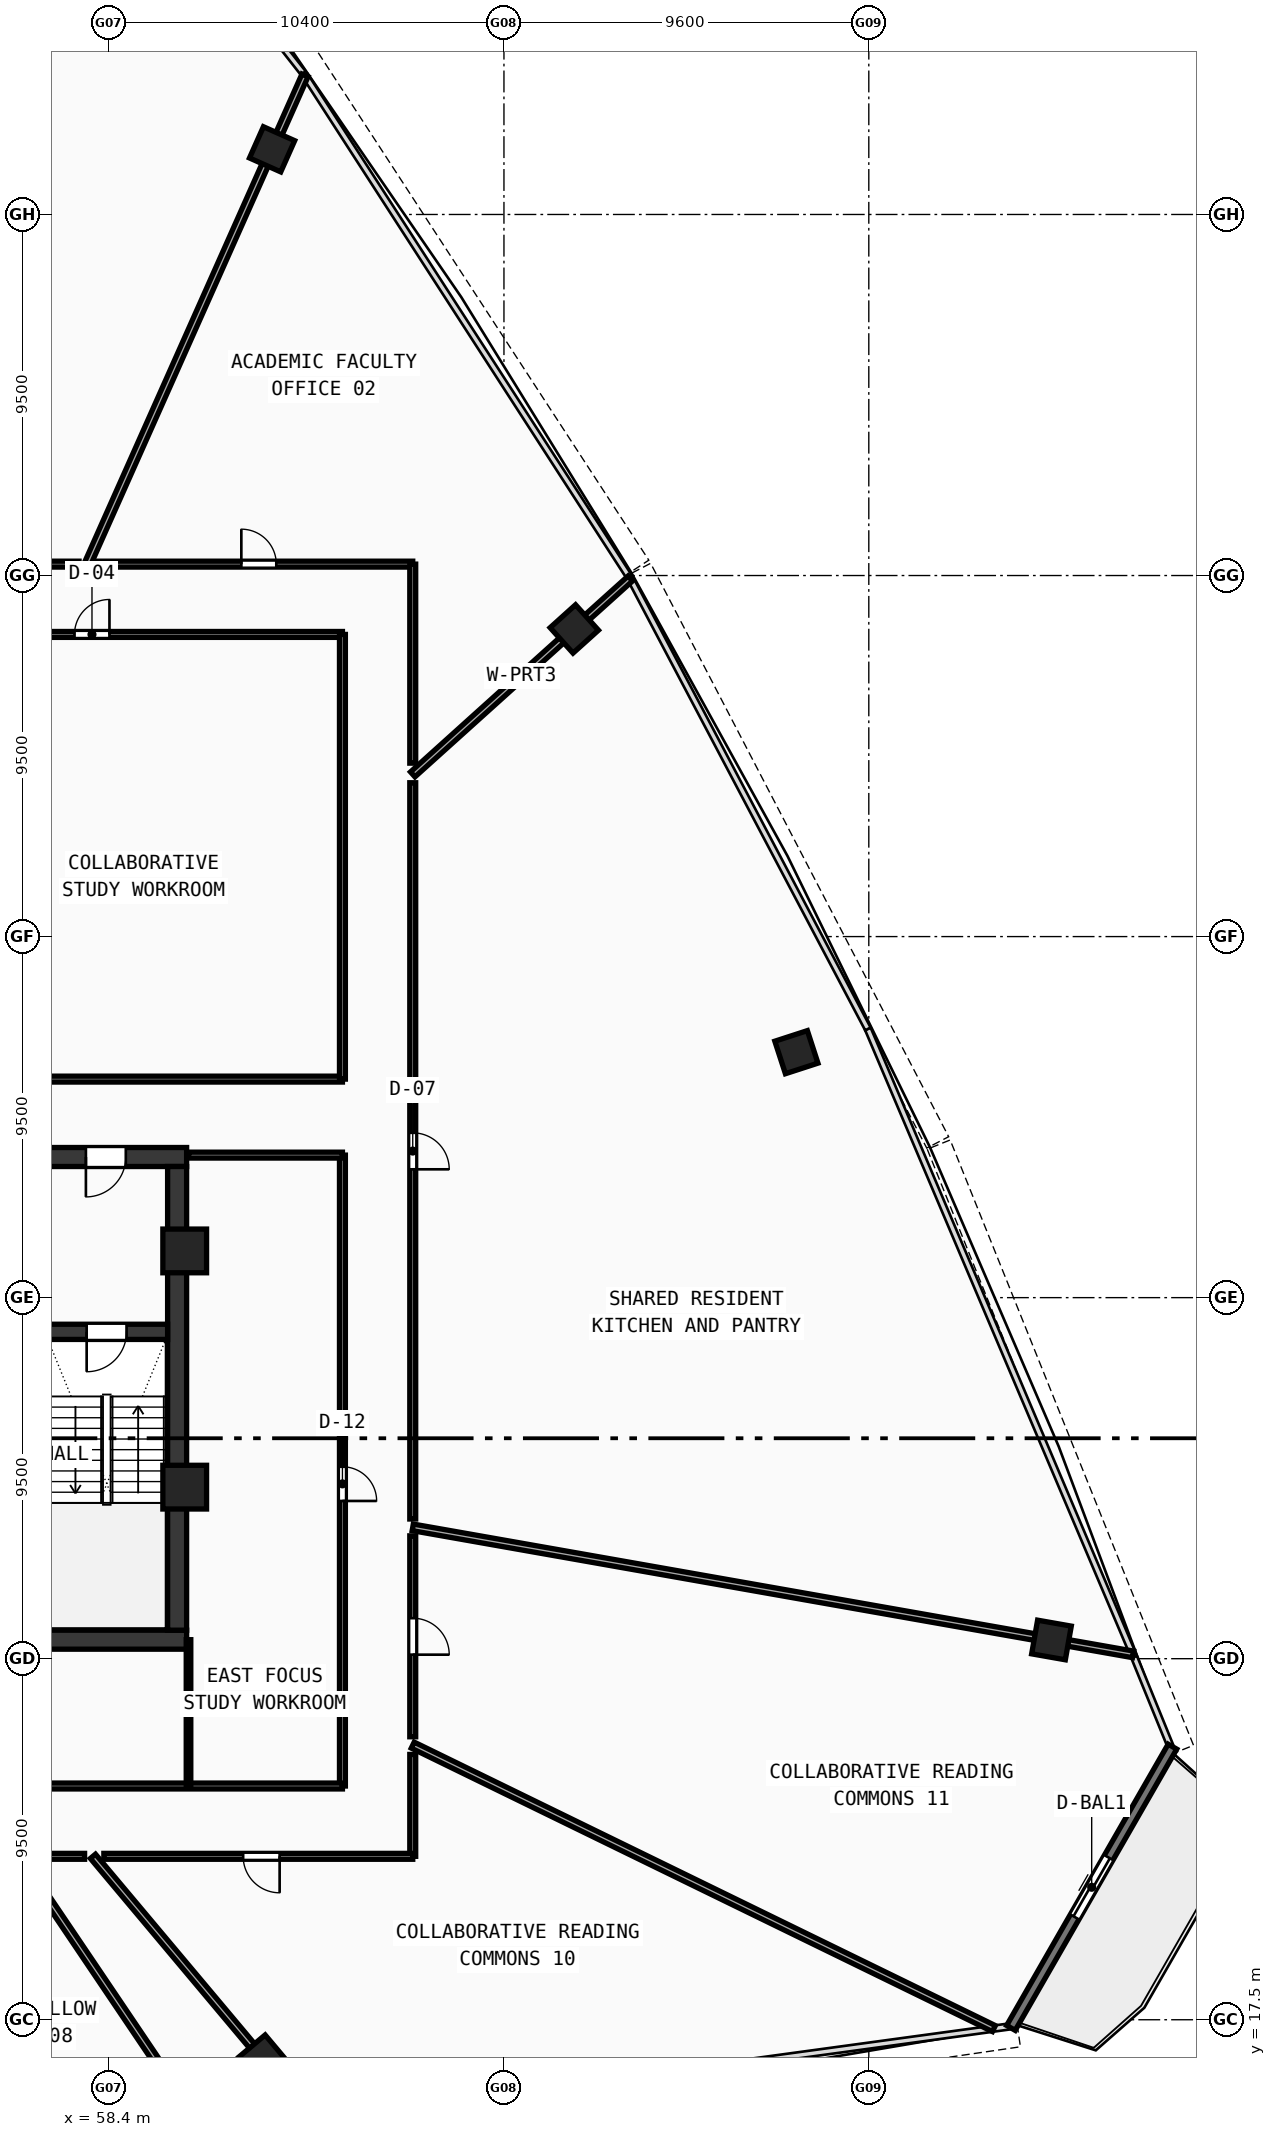
"""IFC4 building model, lengths in metres.
Left out: names, types, materials, properties, quantities, classifications, styles, units other than length and angle.
Written with IfcOpenShell. Run it as: python <this file> out.ifc"""

import sys

from ifc_helpers import new_model, si_unit, direction, frame, frame_2d, origin, origin_with_axes, origin_2d, place, context, subcontext, project, spatial, rectangle, hollow_rectangle, extrude, source, transform, mapped, element, fill, save


model = new_model("IFC4")
c1 = context("Model", 3, precision=1e-05, world=origin(), true_north=direction((0.0, 1.0)))
c2 = subcontext(c1, "Body", "Model", "MODEL_VIEW")
j1 = project(units=[si_unit("LENGTHUNIT", "METRE"), si_unit("PLANEANGLEUNIT", "RADIAN")], contexts=[c1])
p1 = place(None, origin())
s1 = spatial("IfcSite", under=j1, at=p1, CompositionType="ELEMENT")
p2 = place(p1, origin())
s2 = spatial("IfcBuilding", under=s1, at=p2, CompositionType="ELEMENT")
p3 = place(p2, frame((0.0, 0.0, 192.36)))
s3 = spatial("IfcBuildingStorey", under=s2, at=p3, CompositionType="ELEMENT", Elevation=192.36)
p4 = place(p3, frame((35.55, 27.5, 0.0), z_axis=(0.0, 0.0, 1.0), x_axis=(1.0, 0.0, 0.0)))
e1 = element("IfcWall", 1, at=p4, inside=s3, PredefinedType="SHEAR", context=c2, shape_type="SweptSolid", body=[
    extrude(rectangle(XDim=24.9, YDim=0.5, at=frame_2d((12.45, 0.0))), origin(), (0.0, 0.0, 1.0), 3.54),
])
p5 = place(p3, frame((49.2, 40.2, 0.0), z_axis=(0.0, 0.0, 1.0), x_axis=(1.0, 0.0, 0.0)))
e2 = element("IfcWall", 2, at=p5, inside=s3, PredefinedType="SHEAR", context=c2, shape_type="SweptSolid", body=[
    extrude(rectangle(XDim=11.25, YDim=0.5, at=frame_2d((5.625, 0.0))), origin(), (0.0, 0.0, 1.0), 3.54),
])
p6 = place(p5, frame((8.6, 0.0, 0.0)))
e3 = element("IfcOpeningElement", 3, at=p6, cuts=e2, PredefinedType="OPENING", context=c2, shape_type="SweptSolid", body=[
    extrude(rectangle(XDim=1.05, YDim=2.1, at=frame_2d((0.525, 1.05))), frame((0.0, 0.26, 0.0), z_axis=(0.0, -1.0, 0.0), x_axis=(1.0, 0.0, 0.0)), (0.0, 0.0, 1.0), 0.52),
])
p7 = place(p3, frame((60.2, 27.75, 0.0), z_axis=(0.0, 0.0, 1.0), x_axis=(0.0, 1.0, 0.0)))
e4 = element("IfcWall", 4, at=p7, inside=s3, PredefinedType="SHEAR", context=c2, shape_type="SweptSolid", body=[
    extrude(rectangle(XDim=12.2, YDim=0.5, at=frame_2d((6.1, 0.0))), origin(), (0.0, 0.0, 1.0), 3.54),
])
p8 = place(p3, frame((56.8, 35.6, 0.0), z_axis=(0.0, 0.0, 1.0), x_axis=(1.0, 0.0, 0.0)))
e5 = element("IfcWall", 5, at=p8, inside=s3, PredefinedType="SHEAR", context=c2, shape_type="SweptSolid", body=[
    extrude(rectangle(XDim=3.15, YDim=0.4, at=frame_2d((1.575, 0.0))), origin(), (0.0, 0.0, 1.0), 3.54),
])
p9 = place(p8, frame((1.02, 0.0, 0.0)))
e6 = element("IfcOpeningElement", 6, at=p9, cuts=e5, PredefinedType="OPENING", context=c2, shape_type="SweptSolid", body=[
    extrude(rectangle(XDim=1.05, YDim=2.1, at=frame_2d((0.525, 1.05))), frame((0.0, 0.21, 0.0), z_axis=(0.0, -1.0, 0.0), x_axis=(1.0, 0.0, 0.0)), (0.0, 0.0, 1.0), 0.42),
])
m1 = source(origin(), c2, "Body", "SweptSolid", [
    extrude(hollow_rectangle(XDim=1.15, YDim=1.15, WallThickness=0.048, at=origin_2d()), origin(), (0.0, 0.0, 1.0), 3.8),
])
for number, where, z_axis, x_axis in (
    (7, (60.4, 31.513, -0.26), (0.0, 0.0, 1.0), (1.0, 0.0, 0.0)),
    (8, (60.4, 37.729, -0.26), (0.0, 0.0, 1.0), (1.0, 0.0, 0.0)),
):
    element("IfcColumn", number, at=place(p3, frame(where, z_axis=z_axis, x_axis=x_axis)), inside=s3, PredefinedType="COLUMN", context=c2, shape_type="MappedRepresentation", body=[
        mapped(m1, transform((0.0, 0.0, 0.0), scale=1.0)),
    ])
m2 = source(origin(), c2, "Body", "SweptSolid", [
    extrude(hollow_rectangle(XDim=0.9, YDim=0.9, WallThickness=0.036, at=origin_2d()), origin(), (0.0, 0.0, 1.0), 3.8),
])
for number, where, z_axis, x_axis in (
    (9, (62.461, 16.466, -0.26), (0.0, 0.0, 1.0), (0.766, 0.643, 0.0)),
    (10, (83.207, 27.492, -0.26), (0.0, 0.0, 1.0), (0.174, 0.985, 0.0)),
    (11, (76.495, 42.958, -0.26), (0.0, 0.0, 1.0), (-0.309, 0.951, 0.0)),
    (12, (70.651, 54.095, -0.26), (0.0, 0.0, 1.0), (-0.669, 0.743, 0.0)),
    (13, (62.699, 66.715, -0.26), (0.0, 0.0, 1.0), (-0.914, 0.407, 0.0)),
):
    element("IfcColumn", number, at=place(p3, frame(where, z_axis=z_axis, x_axis=x_axis)), inside=s3, PredefinedType="COLUMN", context=c2, shape_type="MappedRepresentation", body=[
        mapped(m2, transform((0.0, 0.0, 0.0), scale=1.0)),
    ])
p10 = place(p3, frame((82.14, 17.285, 0.0), z_axis=(0.0, 0.0, 1.0), x_axis=(0.497930869929, 0.867216725376, 0.0)))
e14 = element("IfcWall", 14, at=p10, inside=s3, PredefinedType="STANDARD", context=c2, shape_type="SweptSolid", body=[
    extrude(rectangle(XDim=8.534, YDim=0.26, at=frame_2d((4.267, 0.0))), origin(), (0.0, 0.0, 1.0), 3.54),
])
p11 = place(p10, frame((3.367, 0.0, 0.0)))
e15 = element("IfcOpeningElement", 15, at=p11, cuts=e14, PredefinedType="OPENING", context=c2, shape_type="SweptSolid", body=[
    extrude(rectangle(XDim=1.8, YDim=2.15, at=frame_2d((0.9, 1.075))), frame((0.0, 0.14, 0.0), z_axis=(0.0, -1.0, 0.0), x_axis=(1.0, 0.0, 0.0)), (0.0, 0.0, 1.0), 0.28),
])
p12 = place(p3, frame((31.45, 42.25, 0.0), z_axis=(0.0, 0.0, 1.0), x_axis=(1.0, 0.0, 0.0)))
e16 = element("IfcWall", 16, at=p12, inside=s3, PredefinedType="PARTITIONING", context=c2, shape_type="SweptSolid", body=[
    extrude(rectangle(XDim=33.1, YDim=0.155, at=frame_2d((16.55, 0.0))), origin(), (0.0, 0.0, 1.0), 2.89),
])
p13 = place(p3, frame((31.45, 53.95, 0.0), z_axis=(0.0, 0.0, 1.0), x_axis=(1.0, 0.0, 0.0)))
e17 = element("IfcWall", 17, at=p13, inside=s3, PredefinedType="PARTITIONING", context=c2, shape_type="SweptSolid", body=[
    extrude(rectangle(XDim=33.1, YDim=0.155, at=frame_2d((16.55, 0.0))), origin(), (0.0, 0.0, 1.0), 2.89),
])
p14 = place(p13, frame((8.0, 0.0, 0.0)))
e18 = element("IfcOpeningElement", 18, at=p14, cuts=e17, PredefinedType="OPENING", context=c2, shape_type="SweptSolid", body=[
    extrude(rectangle(XDim=0.92, YDim=2.1, at=frame_2d((0.46, 1.05))), frame((0.0, 0.087, 0.0), z_axis=(0.0, -1.0, 0.0), x_axis=(1.0, 0.0, 0.0)), (0.0, 0.0, 1.0), 0.175),
])
p15 = place(p13, frame((26.05, 0.0, 0.0)))
e19 = element("IfcOpeningElement", 19, at=p15, cuts=e17, PredefinedType="OPENING", context=c2, shape_type="SweptSolid", body=[
    extrude(rectangle(XDim=0.92, YDim=2.1, at=frame_2d((0.46, 1.05))), frame((0.0, 0.087, 0.0), z_axis=(0.0, -1.0, 0.0), x_axis=(1.0, 0.0, 0.0)), (0.0, 0.0, 1.0), 0.175),
])
p16 = place(p3, frame((64.55, 42.25, 0.0), z_axis=(0.0, 0.0, 1.0), x_axis=(0.0, 1.0, 0.0)))
e20 = element("IfcWall", 20, at=p16, inside=s3, PredefinedType="PARTITIONING", context=c2, shape_type="SweptSolid", body=[
    extrude(rectangle(XDim=11.7, YDim=0.155, at=frame_2d((5.85, 0.0))), origin(), (0.0, 0.0, 1.0), 2.89),
])
p17 = place(p3, frame((64.55, 23.65, 0.0), z_axis=(0.0, 0.0, 1.0), x_axis=(0.0, 1.0, 0.0)))
e21 = element("IfcWall", 21, at=p17, inside=s3, PredefinedType="PARTITIONING", context=c2, shape_type="SweptSolid", body=[
    extrude(rectangle(XDim=16.6, YDim=0.155, at=frame_2d((8.3, 0.0))), origin(), (0.0, 0.0, 1.0), 2.89),
])
p18 = place(p17, frame((7.5, 0.0, 0.0)))
e22 = element("IfcOpeningElement", 22, at=p18, cuts=e21, PredefinedType="OPENING", context=c2, shape_type="SweptSolid", body=[
    extrude(rectangle(XDim=0.9, YDim=2.08, at=frame_2d((0.45, 1.04))), frame((0.0, 0.087, 0.0), z_axis=(0.0, -1.0, 0.0), x_axis=(1.0, 0.0, 0.0)), (0.0, 0.0, 1.0), 0.175),
])
p19 = place(p3, frame((31.45, 23.65, 0.0), z_axis=(0.0, 0.0, 1.0), x_axis=(1.0, 0.0, 0.0)))
e23 = element("IfcWall", 23, at=p19, inside=s3, PredefinedType="PARTITIONING", context=c2, shape_type="SweptSolid", body=[
    extrude(rectangle(XDim=33.1, YDim=0.155, at=frame_2d((16.55, 0.0))), origin(), (0.0, 0.0, 1.0), 2.89),
])
p20 = place(p19, frame((16.0, 0.0, 0.0)))
e24 = element("IfcOpeningElement", 24, at=p20, cuts=e23, PredefinedType="OPENING", context=c2, shape_type="SweptSolid", body=[
    extrude(rectangle(XDim=0.92, YDim=2.1, at=frame_2d((0.46, 1.05))), frame((0.0, 0.087, 0.0), z_axis=(0.0, -1.0, 0.0), x_axis=(1.0, 0.0, 0.0)), (0.0, 0.0, 1.0), 0.175),
])
p21 = place(p3, frame((60.5, 40.25, 0.0), z_axis=(0.0, 0.0, 1.0), x_axis=(1.0, 0.0, 0.0)))
e25 = element("IfcWall", 25, at=p21, inside=s3, PredefinedType="PARTITIONING", context=c2, shape_type="SweptSolid", body=[
    extrude(rectangle(XDim=4.05, YDim=0.155, at=frame_2d((2.025, 0.0))), origin(), (0.0, 0.0, 1.0), 3.54),
])
p22 = place(p3, frame((60.5, 23.65, 0.0), z_axis=(0.0, 0.0, 1.0), x_axis=(0.0, 1.0, 0.0)))
e26 = element("IfcWall", 26, at=p22, inside=s3, PredefinedType="PARTITIONING", context=c2, shape_type="SweptSolid", body=[
    extrude(rectangle(XDim=3.85, YDim=0.12, at=frame_2d((1.925, 0.0))), origin(), (0.0, 0.0, 1.0), 3.14),
])
p23 = place(p3, frame((66.4, 50.267, 0.0), z_axis=(0.0, 0.0, 1.0), x_axis=(0.743141257722, 0.669134568731, 0.0)))
e27 = element("IfcWall", 27, at=p23, inside=s3, PredefinedType="PARTITIONING", context=c2, shape_type="SweptSolid", body=[
    extrude(rectangle(XDim=7.703, YDim=0.175, at=frame_2d((3.852, 0.0))), origin(), (0.0, 0.0, 1.0), 2.89),
])
p24 = place(p3, frame((57.84, 55.8, 0.0), z_axis=(0.0, 0.0, 1.0), x_axis=(0.406725691424, 0.913550333554, 0.0)))
e28 = element("IfcWall", 28, at=p24, inside=s3, PredefinedType="PARTITIONING", context=c2, shape_type="SweptSolid", body=[
    extrude(rectangle(XDim=14.078, YDim=0.175, at=frame_2d((7.039, 0.0))), origin(), (0.0, 0.0, 1.0), 2.89),
])
p25 = place(p3, frame((56.027, 21.8, 0.0), z_axis=(0.0, 0.0, 1.0), x_axis=(0.559186988523, -0.829041562207, 0.0)))
e29 = element("IfcWall", 29, at=p25, inside=s3, PredefinedType="PARTITIONING", context=c2, shape_type="SweptSolid", body=[
    extrude(rectangle(XDim=8.611, YDim=0.175, at=frame_2d((4.306, 0.0))), origin(), (0.0, 0.0, 1.0), 2.89),
])
p26 = place(p3, frame((57.985, 21.8, 0.0), z_axis=(0.0, 0.0, 1.0), x_axis=(0.642790573147, -0.76604195647, 0.0)))
e30 = element("IfcWall", 30, at=p26, inside=s3, PredefinedType="PARTITIONING", context=c2, shape_type="SweptSolid", body=[
    extrude(rectangle(XDim=9.1, YDim=0.175, at=frame_2d((4.55, 0.0))), origin(), (0.0, 0.0, 1.0), 2.89),
])
p27 = place(p3, frame((66.4, 24.726, 0.0), z_axis=(0.0, 0.0, 1.0), x_axis=(0.898797681505, -0.438363693435, 0.0)))
e31 = element("IfcWall", 31, at=p27, inside=s3, PredefinedType="PARTITIONING", context=c2, shape_type="SweptSolid", body=[
    extrude(rectangle(XDim=17.013, YDim=0.175, at=frame_2d((8.507, 0.0))), origin(), (0.0, 0.0, 1.0), 2.89),
])
p28 = place(p3, frame((66.4, 30.456, 0.0), z_axis=(0.0, 0.0, 1.0), x_axis=(0.984807685374, -0.173648561263, 0.0)))
e32 = element("IfcWall", 32, at=p28, inside=s3, PredefinedType="PARTITIONING", context=c2, shape_type="SweptSolid", body=[
    extrude(rectangle(XDim=19.246, YDim=0.175, at=frame_2d((9.623, 0.0))), origin(), (0.0, 0.0, 1.0), 2.89),
])
p29 = place(p3, frame((52.391, 55.8, 0.0), z_axis=(0.0, 0.0, 1.0), x_axis=(1.0, 0.0, 0.0)))
e33 = element("IfcWall", 33, at=p29, inside=s3, PredefinedType="PARTITIONING", context=c2, shape_type="SweptSolid", body=[
    extrude(rectangle(XDim=5.229, YDim=0.155, at=frame_2d((2.614, 0.0))), origin(), (0.0, 0.0, 1.0), 2.89),
])
p30 = place(p3, frame((58.08, 55.8, 0.0), z_axis=(0.0, 0.0, 1.0), x_axis=(1.0, 0.0, 0.0)))
e34 = element("IfcWall", 34, at=p30, inside=s3, PredefinedType="PARTITIONING", context=c2, shape_type="SweptSolid", body=[
    extrude(rectangle(XDim=8.32, YDim=0.155, at=frame_2d((4.16, 0.0))), origin(), (0.0, 0.0, 1.0), 3.14),
])
p31 = place(p30, frame((3.809, 0.0, 0.0)))
e35 = element("IfcOpeningElement", 35, at=p31, cuts=e34, PredefinedType="OPENING", context=c2, shape_type="SweptSolid", body=[
    extrude(rectangle(XDim=0.92, YDim=2.1, at=frame_2d((0.46, 1.05))), frame((0.0, 0.087, 0.0), z_axis=(0.0, -1.0, 0.0), x_axis=(1.0, 0.0, 0.0)), (0.0, 0.0, 1.0), 0.175),
])
p32 = place(p3, frame((66.4, 55.8, 0.0), z_axis=(0.0, 0.0, 1.0), x_axis=(0.0, -1.0, 0.0)))
e36 = element("IfcWall", 36, at=p32, inside=s3, PredefinedType="PARTITIONING", context=c2, shape_type="SweptSolid", body=[
    extrude(rectangle(XDim=5.237, YDim=0.155, at=frame_2d((2.618, 0.0))), origin(), (0.0, 0.0, 1.0), 3.54),
])
p33 = place(p3, frame((66.4, 50.048, 0.0), z_axis=(0.0, 0.0, 1.0), x_axis=(0.0, -1.0, 0.0)))
e37 = element("IfcWall", 37, at=p33, inside=s3, PredefinedType="PARTITIONING", context=c2, shape_type="SweptSolid", body=[
    extrude(rectangle(XDim=19.372, YDim=0.155, at=frame_2d((9.686, 0.0))), origin(), (0.0, 0.0, 1.0), 2.89),
])
p34 = place(p33, frame((9.211, 0.0, 0.0)))
e38 = element("IfcOpeningElement", 38, at=p34, cuts=e37, PredefinedType="OPENING", context=c2, shape_type="SweptSolid", body=[
    extrude(rectangle(XDim=0.96, YDim=2.12, at=frame_2d((0.48, 1.06))), frame((0.0, 0.087, 0.0), z_axis=(0.0, -1.0, 0.0), x_axis=(1.0, 0.0, 0.0)), (0.0, 0.0, 1.0), 0.175),
])
p35 = place(p3, frame((66.4, 30.232, 0.0), z_axis=(0.0, 0.0, 1.0), x_axis=(0.0, -1.0, 0.0)))
e39 = element("IfcWall", 39, at=p35, inside=s3, PredefinedType="PARTITIONING", context=c2, shape_type="SweptSolid", body=[
    extrude(rectangle(XDim=5.287, YDim=0.155, at=frame_2d((2.643, 0.0))), origin(), (0.0, 0.0, 1.0), 3.14),
])
p36 = place(p35, frame((2.167, 0.0, 0.0)))
e40 = element("IfcOpeningElement", 40, at=p36, cuts=e39, PredefinedType="OPENING", context=c2, shape_type="SweptSolid", body=[
    extrude(rectangle(XDim=0.96, YDim=2.12, at=frame_2d((0.48, 1.06))), frame((0.0, 0.087, 0.0), z_axis=(0.0, -1.0, 0.0), x_axis=(1.0, 0.0, 0.0)), (0.0, 0.0, 1.0), 0.175),
])
p37 = place(p3, frame((66.4, 24.481, 0.0), z_axis=(0.0, 0.0, 1.0), x_axis=(0.0, -1.0, 0.0)))
e41 = element("IfcWall", 41, at=p37, inside=s3, PredefinedType="PARTITIONING", context=c2, shape_type="SweptSolid", body=[
    extrude(rectangle(XDim=2.681, YDim=0.155, at=frame_2d((1.34, 0.0))), origin(), (0.0, 0.0, 1.0), 3.14),
])
p38 = place(p3, frame((66.4, 21.8, 0.0), z_axis=(0.0, 0.0, 1.0), x_axis=(-1.0, 0.0, 0.0)))
e42 = element("IfcWall", 42, at=p38, inside=s3, PredefinedType="PARTITIONING", context=c2, shape_type="SweptSolid", body=[
    extrude(rectangle(XDim=8.127, YDim=0.155, at=frame_2d((4.064, 0.0))), origin(), (0.0, 0.0, 1.0), 3.14),
])
p39 = place(p38, frame((3.502, 0.0, 0.0)))
e43 = element("IfcOpeningElement", 43, at=p39, cuts=e42, PredefinedType="OPENING", context=c2, shape_type="SweptSolid", body=[
    extrude(rectangle(XDim=0.96, YDim=2.12, at=frame_2d((0.48, 1.06))), frame((0.0, 0.087, 0.0), z_axis=(0.0, -1.0, 0.0), x_axis=(1.0, 0.0, 0.0)), (0.0, 0.0, 1.0), 0.175),
])
p40 = place(p3, frame((57.765, 21.8, 0.0), z_axis=(0.0, 0.0, 1.0), x_axis=(-1.0, 0.0, 0.0)))
e44 = element("IfcWall", 44, at=p40, inside=s3, PredefinedType="PARTITIONING", context=c2, shape_type="SweptSolid", body=[
    extrude(rectangle(XDim=1.473, YDim=0.155, at=frame_2d((0.737, 0.0))), origin(), (0.0, 0.0, 1.0), 2.89),
])
m3 = source(origin(), c2, "Body", "SweptSolid", [
    extrude(rectangle(XDim=1.8, YDim=2.15, at=frame_2d((0.9, 1.075))), frame((0.0, 0.025, 0.0), z_axis=(0.0, -1.0, 0.0), x_axis=(1.0, 0.0, 0.0)), (0.0, 0.0, 1.0), 0.05),
])
p41 = place(p11, origin_with_axes())
e45 = element("IfcDoor", 45, at=p41, inside=s3, OperationType="DOUBLE_DOOR_SLIDING", PredefinedType="DOOR", context=c2, shape_type="MappedRepresentation", body=[
    mapped(m3, transform((0.0, 0.0, 0.0), scale=1.0)),
])
fill(e15, e45)
m4 = source(origin(), c2, "Body", "SweptSolid", [
    extrude(rectangle(XDim=1.05, YDim=2.1, at=frame_2d((0.525, 1.05))), frame((0.0, 0.025, 0.0), z_axis=(0.0, -1.0, 0.0), x_axis=(1.0, 0.0, 0.0)), (0.0, 0.0, 1.0), 0.05),
])
p42 = place(p9, frame((1.05, 0.0, 0.0), z_axis=(0.0, 0.0, 1.0), x_axis=(-1.0, 0.0, 0.0)))
e46 = element("IfcDoor", 46, at=p42, inside=s3, OperationType="SINGLE_SWING_RIGHT", PredefinedType="DOOR", context=c2, shape_type="MappedRepresentation", body=[
    mapped(m4, transform((0.0, 0.0, 0.0), scale=1.0)),
])
fill(e6, e46)
p43 = place(p6, frame((1.05, 0.0, 0.0), z_axis=(0.0, 0.0, 1.0), x_axis=(-1.0, 0.0, 0.0)))
e47 = element("IfcDoor", 47, at=p43, inside=s3, OperationType="SINGLE_SWING_RIGHT", PredefinedType="DOOR", context=c2, shape_type="MappedRepresentation", body=[
    mapped(m4, transform((0.0, 0.0, 0.0), scale=1.0)),
])
fill(e3, e47)
m5 = source(origin(), c2, "Body", "SweptSolid", [
    extrude(rectangle(XDim=0.92, YDim=2.1, at=frame_2d((0.46, 1.05))), frame((0.0, 0.025, 0.0), z_axis=(0.0, -1.0, 0.0), x_axis=(1.0, 0.0, 0.0)), (0.0, 0.0, 1.0), 0.05),
])
p44 = place(p15, origin_with_axes())
e48 = element("IfcDoor", 48, at=p44, inside=s3, OperationType="SINGLE_SWING_RIGHT", PredefinedType="DOOR", context=c2, shape_type="MappedRepresentation", body=[
    mapped(m5, transform((0.0, 0.0, 0.0), scale=1.0)),
])
fill(e19, e48)
m6 = source(origin(), c2, "Body", "SweptSolid", [
    extrude(rectangle(XDim=0.9, YDim=2.08, at=frame_2d((0.45, 1.04))), frame((0.0, 0.025, 0.0), z_axis=(0.0, -1.0, 0.0), x_axis=(1.0, 0.0, 0.0)), (0.0, 0.0, 1.0), 0.05),
])
p45 = place(p18, frame((0.9, 0.0, 0.0), z_axis=(0.0, 0.0, 1.0), x_axis=(-1.0, 0.0, 0.0)))
e49 = element("IfcDoor", 49, at=p45, inside=s3, OperationType="SINGLE_SWING_RIGHT", PredefinedType="DOOR", context=c2, shape_type="MappedRepresentation", body=[
    mapped(m6, transform((0.0, 0.0, 0.0), scale=1.0)),
])
fill(e22, e49)
m7 = source(origin(), c2, "Body", "SweptSolid", [
    extrude(rectangle(XDim=0.96, YDim=2.12, at=frame_2d((0.48, 1.06))), frame((0.0, 0.025, 0.0), z_axis=(0.0, -1.0, 0.0), x_axis=(1.0, 0.0, 0.0)), (0.0, 0.0, 1.0), 0.05),
])
p46 = place(p34, origin_with_axes())
e50 = element("IfcDoor", 50, at=p46, inside=s3, OperationType="SINGLE_SWING_RIGHT", PredefinedType="DOOR", context=c2, shape_type="MappedRepresentation", body=[
    mapped(m7, transform((0.0, 0.0, 0.0), scale=1.0)),
])
fill(e38, e50)
p47 = place(p31, origin_with_axes())
e51 = element("IfcDoor", 51, at=p47, inside=s3, OperationType="SINGLE_SWING_LEFT", PredefinedType="DOOR", context=c2, shape_type="MappedRepresentation", body=[
    mapped(m5, transform((0.0, 0.0, 0.0), scale=1.0)),
])
fill(e35, e51)
p48 = place(p39, origin_with_axes())
e52 = element("IfcDoor", 52, at=p48, inside=s3, OperationType="SINGLE_SWING_LEFT", PredefinedType="DOOR", context=c2, shape_type="MappedRepresentation", body=[
    mapped(m7, transform((0.0, 0.0, 0.0), scale=1.0)),
])
fill(e43, e52)
p49 = place(p36, origin_with_axes())
e53 = element("IfcDoor", 53, at=p49, inside=s3, OperationType="SINGLE_SWING_RIGHT", PredefinedType="DOOR", context=c2, shape_type="MappedRepresentation", body=[
    mapped(m7, transform((0.0, 0.0, 0.0), scale=1.0)),
])
fill(e40, e53)
save(model, sys.argv[1])
